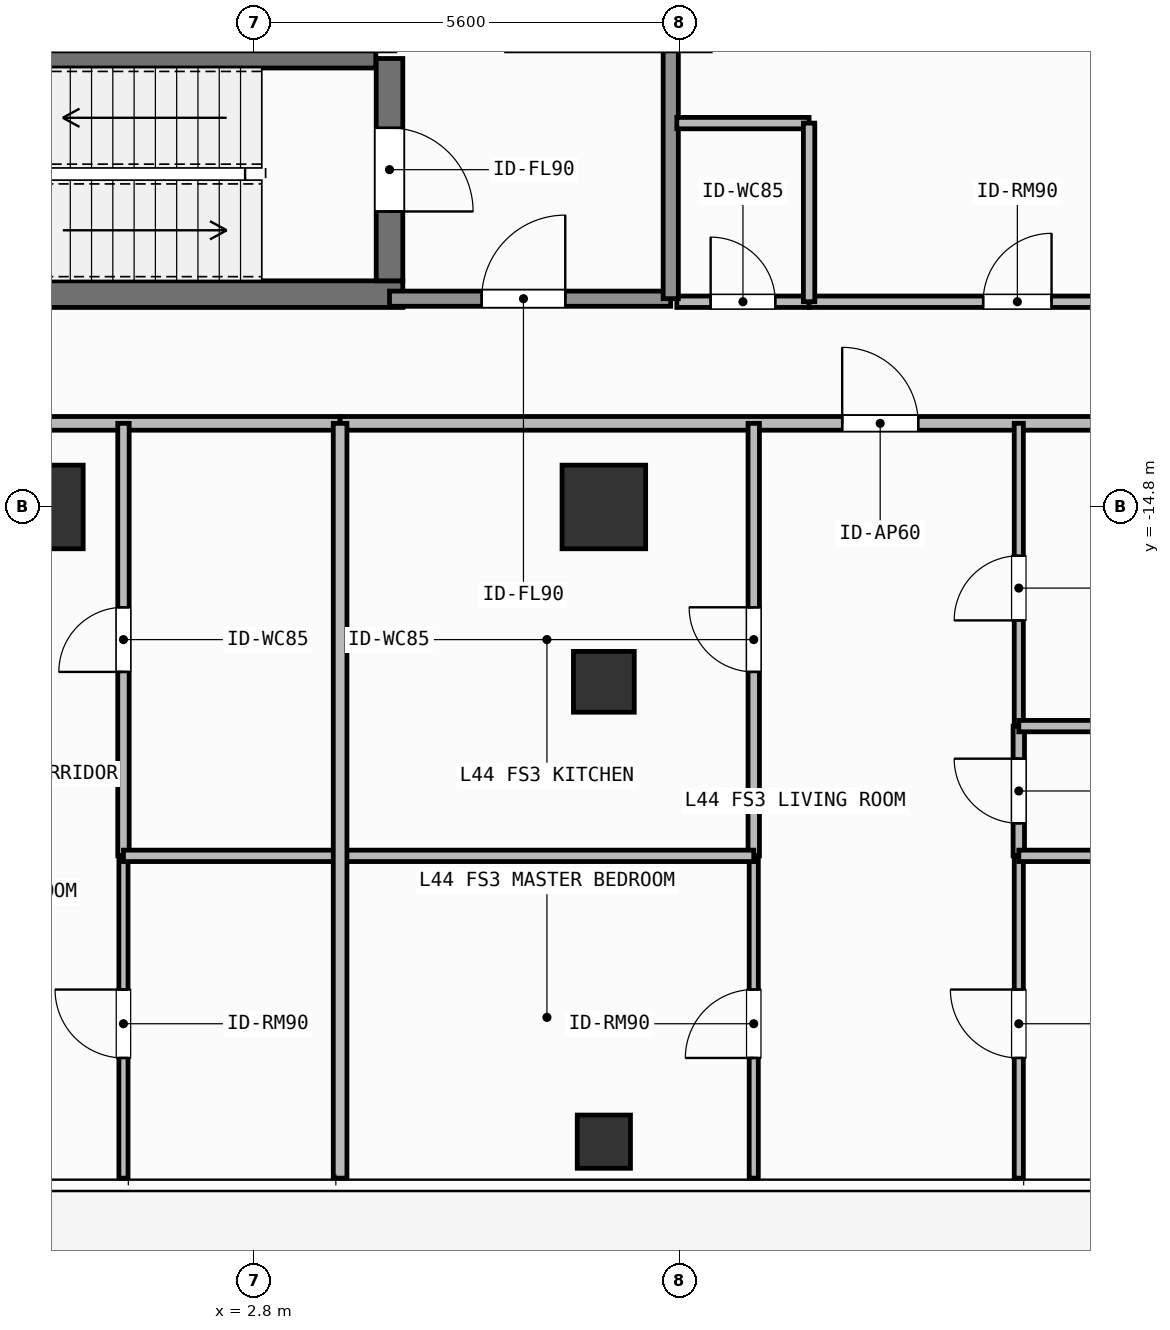
"""IFC4 building model, lengths in metres.
Left out: names, types, materials, properties, quantities, classifications, styles, units other than length and angle.
Written with IfcOpenShell. Run it as: python <this file> out.ifc"""

import sys

from ifc_helpers import new_model, si_unit, direction, frame, frame_2d, origin, origin_2d, place, context, subcontext, project, spatial, rectangle, hollow_rectangle, extrude, element, fill, save


model = new_model("IFC4")
c1 = context("Model", 3, precision=1e-05, world=origin(), true_north=direction((0.0, 1.0)))
c2 = subcontext(c1, "Body", "Model", "MODEL_VIEW")
j1 = project(units=[si_unit("LENGTHUNIT", "METRE"), si_unit("PLANEANGLEUNIT", "RADIAN")], contexts=[c1])
p1 = place(None, origin())
s1 = spatial("IfcSite", under=j1, at=p1, CompositionType="ELEMENT")
p2 = place(p1, origin())
s2 = spatial("IfcBuilding", under=s1, at=p2, CompositionType="ELEMENT")
p3 = place(p2, frame((0.0, 0.0, 179.7)))
s3 = spatial("IfcBuildingStorey", under=s2, at=p3, CompositionType="ELEMENT", Elevation=179.7)
p4 = place(p3, frame((-2.555, -12.0, 0.0), z_axis=(0.0, 0.0, 1.0), x_axis=(1.0, 0.0, 0.0)))
e1 = element("IfcWall", 1, at=p4, inside=s3, PredefinedType="SHEAR", context=c2, shape_type="SweptSolid", body=[
    extrude(rectangle(XDim=7.31, YDim=0.35, at=frame_2d((3.655, 0.0))), origin(), (0.0, 0.0, 1.0), 3.9),
])
p5 = place(p3, frame((-2.2, -8.913, 0.0), z_axis=(0.0, 0.0, 1.0), x_axis=(1.0, 0.0, 0.0)))
e2 = element("IfcWall", 2, at=p5, inside=s3, PredefinedType="SHEAR", context=c2, shape_type="SweptSolid", body=[
    extrude(rectangle(XDim=6.6, YDim=0.225, at=frame_2d((3.3, 0.0))), origin(), (0.0, 0.0, 1.0), 3.9),
])
p6 = place(p3, frame((4.58, -8.9, 0.0), z_axis=(0.0, 0.0, 1.0), x_axis=(0.0, -1.0, 0.0)))
e3 = element("IfcWall", 3, at=p6, inside=s3, PredefinedType="SHEAR", context=c2, shape_type="SweptSolid", body=[
    extrude(rectangle(XDim=2.925, YDim=0.35, at=frame_2d((1.462, 0.0))), origin(), (0.0, 0.0, 1.0), 3.9),
])
p7 = place(p6, frame((0.913, 0.0, 0.0)))
e4 = element("IfcOpeningElement", 4, at=p7, cuts=e3, PredefinedType="OPENING", context=c2, shape_type="SweptSolid", body=[
    extrude(rectangle(XDim=1.1, YDim=2.15, at=frame_2d((0.55, 1.075))), frame((0.0, 0.185, 0.0), z_axis=(0.0, -1.0, 0.0), x_axis=(1.0, 0.0, 0.0)), (0.0, 0.0, 1.0), 0.37),
])
for number, where, z_axis, x_axis in (
    (5, (0.0, -14.8, 0.0), (0.0, 0.0, 1.0), (1.0, 0.0, 0.0)),
    (6, (7.4, -14.8, 0.0), (0.0, 0.0, 1.0), (1.0, 0.0, 0.0)),
):
    element("IfcColumn", number, at=place(p3, frame(where, z_axis=z_axis, x_axis=x_axis)), inside=s3, PredefinedType="COLUMN", context=c2, shape_type="SweptSolid", body=[
        extrude(rectangle(XDim=1.1, YDim=1.1, at=origin_2d()), origin(), (0.0, 0.0, 1.0), 3.9),
    ])
p8 = place(p3, frame((7.4, -17.1, 0.0), z_axis=(0.0, 0.0, 1.0), x_axis=(1.0, 0.0, 0.0)))
e7 = element("IfcColumn", 7, at=p8, inside=s3, PredefinedType="COLUMN", context=c2, shape_type="SweptSolid", body=[
    extrude(hollow_rectangle(XDim=0.8, YDim=0.8, WallThickness=0.036, at=origin_2d()), origin(), (0.0, 0.0, 1.0), 3.9),
])
p9 = place(p3, frame((7.4, -23.15, 0.0), z_axis=(0.0, 0.0, 1.0), x_axis=(1.0, 0.0, 0.0)))
e8 = element("IfcColumn", 8, at=p9, inside=s3, PredefinedType="COLUMN", context=c2, shape_type="SweptSolid", body=[
    extrude(hollow_rectangle(XDim=0.7, YDim=0.7, WallThickness=0.032, at=origin_2d()), origin(), (0.0, 0.0, 1.0), 3.9),
])
p10 = place(p3, frame((4.58, -12.06, 0.0), z_axis=(0.0, 0.0, 1.0), x_axis=(1.0, 0.0, 0.0)))
e9 = element("IfcWall", 9, at=p10, inside=s3, PredefinedType="SOLIDWALL", context=c2, shape_type="SweptSolid", body=[
    extrude(rectangle(XDim=3.7, YDim=0.2, at=frame_2d((1.85, 0.0))), origin(), (0.0, 0.0, 1.0), 3.68),
])
p11 = place(p10, frame((1.212, 0.0, 0.0)))
e10 = element("IfcOpeningElement", 10, at=p11, cuts=e9, PredefinedType="OPENING", context=c2, shape_type="SweptSolid", body=[
    extrude(rectangle(XDim=1.1, YDim=2.15, at=frame_2d((0.55, 1.075))), frame((0.0, 0.11, 0.0), z_axis=(0.0, -1.0, 0.0), x_axis=(1.0, 0.0, 0.0)), (0.0, 0.0, 1.0), 0.22),
])
p12 = place(p3, frame((8.36, -12.1, 0.0), z_axis=(0.0, 0.0, 1.0), x_axis=(1.0, 0.0, 0.0)))
e11 = element("IfcWall", 11, at=p12, inside=s3, PredefinedType="PARTITIONING", context=c2, shape_type="SweptSolid", body=[
    extrude(rectangle(XDim=1.74, YDim=0.15, at=frame_2d((0.87, 0.0))), origin(), (0.0, 0.0, 1.0), 3.68),
])
p13 = place(p12, frame((0.445, 0.0, 0.0)))
e12 = element("IfcOpeningElement", 12, at=p13, cuts=e11, PredefinedType="OPENING", context=c2, shape_type="SweptSolid", body=[
    extrude(rectangle(XDim=0.85, YDim=2.1, at=frame_2d((0.425, 1.05))), frame((0.0, 0.085, 0.0), z_axis=(0.0, -1.0, 0.0), x_axis=(1.0, 0.0, 0.0)), (0.0, 0.0, 1.0), 0.17),
])
p14 = place(p3, frame((10.1, -12.1, 0.0), z_axis=(0.0, 0.0, 1.0), x_axis=(1.0, 0.0, 0.0)))
e13 = element("IfcWall", 13, at=p14, inside=s3, PredefinedType="PARTITIONING", context=c2, shape_type="SweptSolid", body=[
    extrude(rectangle(XDim=5.48, YDim=0.15, at=frame_2d((2.74, 0.0))), origin(), (0.0, 0.0, 1.0), 3.68),
])
p15 = place(p14, frame((2.29, 0.0, 0.0)))
e14 = element("IfcOpeningElement", 14, at=p15, cuts=e13, PredefinedType="OPENING", context=c2, shape_type="SweptSolid", body=[
    extrude(rectangle(XDim=0.9, YDim=2.1, at=frame_2d((0.45, 1.05))), frame((0.0, 0.085, 0.0), z_axis=(0.0, -1.0, 0.0), x_axis=(1.0, 0.0, 0.0)), (0.0, 0.0, 1.0), 0.17),
])
p16 = place(p3, frame((-6.618, -13.7, 0.0), z_axis=(0.0, 0.0, 1.0), x_axis=(1.0, 0.0, 0.0)))
e15 = element("IfcWall", 15, at=p16, inside=s3, PredefinedType="PARTITIONING", context=c2, shape_type="SweptSolid", body=[
    extrude(rectangle(XDim=10.548, YDim=0.18, at=frame_2d((5.274, 0.0))), origin(), (0.0, 0.0, 1.0), 3.68),
])
p17 = place(p16, frame((4.951, 0.0, 0.0)))
e16 = element("IfcOpeningElement", 16, at=p17, cuts=e15, PredefinedType="OPENING", context=c2, shape_type="SweptSolid", body=[
    extrude(rectangle(XDim=1.0, YDim=2.2, at=frame_2d((0.5, 1.1))), frame((0.0, 0.1, 0.0), z_axis=(0.0, -1.0, 0.0), x_axis=(1.0, 0.0, 0.0)), (0.0, 0.0, 1.0), 0.2),
])
p18 = place(p3, frame((1.08, -19.39, 0.0), z_axis=(0.0, 0.0, 1.0), x_axis=(0.0, 1.0, 0.0)))
e17 = element("IfcWall", 17, at=p18, inside=s3, PredefinedType="PARTITIONING", context=c2, shape_type="SweptSolid", body=[
    extrude(rectangle(XDim=5.69, YDim=0.15, at=frame_2d((2.845, 0.0))), origin(), (0.0, 0.0, 1.0), 3.68),
])
p19 = place(p18, frame((2.42, 0.0, 0.0)))
e18 = element("IfcOpeningElement", 18, at=p19, cuts=e17, PredefinedType="OPENING", context=c2, shape_type="SweptSolid", body=[
    extrude(rectangle(XDim=0.85, YDim=2.1, at=frame_2d((0.425, 1.05))), frame((0.0, 0.085, 0.0), z_axis=(0.0, -1.0, 0.0), x_axis=(1.0, 0.0, 0.0)), (0.0, 0.0, 1.0), 0.17),
])
p20 = place(p3, frame((1.08, -23.63, 0.0), z_axis=(0.0, 0.0, 1.0), x_axis=(0.0, 1.0, 0.0)))
e19 = element("IfcWall", 19, at=p20, inside=s3, PredefinedType="PARTITIONING", context=c2, shape_type="SweptSolid", body=[
    extrude(rectangle(XDim=4.24, YDim=0.12, at=frame_2d((2.12, 0.0))), origin(), (0.0, 0.0, 1.0), 3.68),
])
p21 = place(p20, frame((1.581, 0.0, 0.0)))
e20 = element("IfcOpeningElement", 20, at=p21, cuts=e19, PredefinedType="OPENING", context=c2, shape_type="SweptSolid", body=[
    extrude(rectangle(XDim=0.9, YDim=2.1, at=frame_2d((0.45, 1.05))), frame((0.0, 0.07, 0.0), z_axis=(0.0, -1.0, 0.0), x_axis=(1.0, 0.0, 0.0)), (0.0, 0.0, 1.0), 0.14),
])
p22 = place(p3, frame((3.93, -13.7, 0.0), z_axis=(0.0, 0.0, 1.0), x_axis=(1.0, 0.0, 0.0)))
e21 = element("IfcWall", 21, at=p22, inside=s3, PredefinedType="PARTITIONING", context=c2, shape_type="SweptSolid", body=[
    extrude(rectangle(XDim=14.39, YDim=0.18, at=frame_2d((7.195, 0.0))), origin(), (0.0, 0.0, 1.0), 3.68),
])
p23 = place(p22, frame((6.605, 0.0, 0.0)))
e22 = element("IfcOpeningElement", 22, at=p23, cuts=e21, PredefinedType="OPENING", context=c2, shape_type="SweptSolid", body=[
    extrude(rectangle(XDim=1.0, YDim=2.2, at=frame_2d((0.5, 1.1))), frame((0.0, 0.1, 0.0), z_axis=(0.0, -1.0, 0.0), x_axis=(1.0, 0.0, 0.0)), (0.0, 0.0, 1.0), 0.2),
])
p24 = place(p3, frame((9.372, -19.39, 0.0), z_axis=(0.0, 0.0, 1.0), x_axis=(0.0, 1.0, 0.0)))
e23 = element("IfcWall", 23, at=p24, inside=s3, PredefinedType="PARTITIONING", context=c2, shape_type="SweptSolid", body=[
    extrude(rectangle(XDim=5.69, YDim=0.15, at=frame_2d((2.845, 0.0))), origin(), (0.0, 0.0, 1.0), 3.68),
])
p25 = place(p24, frame((2.42, 0.0, 0.0)))
e24 = element("IfcOpeningElement", 24, at=p25, cuts=e23, PredefinedType="OPENING", context=c2, shape_type="SweptSolid", body=[
    extrude(rectangle(XDim=0.85, YDim=2.1, at=frame_2d((0.425, 1.05))), frame((0.0, 0.085, 0.0), z_axis=(0.0, -1.0, 0.0), x_axis=(1.0, 0.0, 0.0)), (0.0, 0.0, 1.0), 0.17),
])
p26 = place(p3, frame((9.372, -23.63, 0.0), z_axis=(0.0, 0.0, 1.0), x_axis=(0.0, 1.0, 0.0)))
e25 = element("IfcWall", 25, at=p26, inside=s3, PredefinedType="PARTITIONING", context=c2, shape_type="SweptSolid", body=[
    extrude(rectangle(XDim=4.24, YDim=0.12, at=frame_2d((2.12, 0.0))), origin(), (0.0, 0.0, 1.0), 3.68),
])
p27 = place(p26, frame((1.581, 0.0, 0.0)))
e26 = element("IfcOpeningElement", 26, at=p27, cuts=e25, PredefinedType="OPENING", context=c2, shape_type="SweptSolid", body=[
    extrude(rectangle(XDim=0.9, YDim=2.1, at=frame_2d((0.45, 1.05))), frame((0.0, 0.07, 0.0), z_axis=(0.0, -1.0, 0.0), x_axis=(1.0, 0.0, 0.0)), (0.0, 0.0, 1.0), 0.14),
])
p28 = place(p3, frame((12.859, -19.39, 0.0), z_axis=(0.0, 0.0, 1.0), x_axis=(0.0, 1.0, 0.0)))
e27 = element("IfcWall", 27, at=p28, inside=s3, PredefinedType="PARTITIONING", context=c2, shape_type="SweptSolid", body=[
    extrude(rectangle(XDim=1.707, YDim=0.15, at=frame_2d((0.854, 0.0))), origin(), (0.0, 0.0, 1.0), 3.68),
])
p29 = place(p28, frame((0.428, 0.0, 0.0)))
e28 = element("IfcOpeningElement", 28, at=p29, cuts=e27, PredefinedType="OPENING", context=c2, shape_type="SweptSolid", body=[
    extrude(rectangle(XDim=0.85, YDim=2.1, at=frame_2d((0.425, 1.05))), frame((0.0, 0.085, 0.0), z_axis=(0.0, -1.0, 0.0), x_axis=(1.0, 0.0, 0.0)), (0.0, 0.0, 1.0), 0.17),
])
p30 = place(p3, frame((12.859, -17.683, 0.0), z_axis=(0.0, 0.0, 1.0), x_axis=(0.0, 1.0, 0.0)))
e29 = element("IfcWall", 29, at=p30, inside=s3, PredefinedType="PARTITIONING", context=c2, shape_type="SweptSolid", body=[
    extrude(rectangle(XDim=3.983, YDim=0.12, at=frame_2d((1.992, 0.0))), origin(), (0.0, 0.0, 1.0), 3.68),
])
p31 = place(p30, frame((1.391, 0.0, 0.0)))
e30 = element("IfcOpeningElement", 30, at=p31, cuts=e29, PredefinedType="OPENING", context=c2, shape_type="SweptSolid", body=[
    extrude(rectangle(XDim=0.85, YDim=2.1, at=frame_2d((0.425, 1.05))), frame((0.0, 0.07, 0.0), z_axis=(0.0, -1.0, 0.0), x_axis=(1.0, 0.0, 0.0)), (0.0, 0.0, 1.0), 0.14),
])
p32 = place(p3, frame((12.859, -23.63, 0.0), z_axis=(0.0, 0.0, 1.0), x_axis=(0.0, 1.0, 0.0)))
e31 = element("IfcWall", 31, at=p32, inside=s3, PredefinedType="PARTITIONING", context=c2, shape_type="SweptSolid", body=[
    extrude(rectangle(XDim=4.24, YDim=0.12, at=frame_2d((2.12, 0.0))), origin(), (0.0, 0.0, 1.0), 3.68),
])
p33 = place(p32, frame((1.581, 0.0, 0.0)))
e32 = element("IfcOpeningElement", 32, at=p33, cuts=e31, PredefinedType="OPENING", context=c2, shape_type="SweptSolid", body=[
    extrude(rectangle(XDim=0.9, YDim=2.1, at=frame_2d((0.45, 1.05))), frame((0.0, 0.07, 0.0), z_axis=(0.0, -1.0, 0.0), x_axis=(1.0, 0.0, 0.0)), (0.0, 0.0, 1.0), 0.14),
])
p34 = place(p3, frame((8.28, -12.06, 0.0), z_axis=(0.0, 0.0, 1.0), x_axis=(0.0, 1.0, 0.0)))
e33 = element("IfcWall", 33, at=p34, inside=s3, PredefinedType="SOLIDWALL", context=c2, shape_type="SweptSolid", body=[
    extrude(rectangle(XDim=3.26, YDim=0.2, at=frame_2d((1.63, 0.0))), origin(), (0.0, 0.0, 1.0), 3.68),
])
p35 = place(p3, frame((8.36, -9.75, 0.0), z_axis=(0.0, 0.0, 1.0), x_axis=(1.0, 0.0, 0.0)))
e34 = element("IfcWall", 34, at=p35, inside=s3, PredefinedType="PARTITIONING", context=c2, shape_type="SweptSolid", body=[
    extrude(rectangle(XDim=1.74, YDim=0.15, at=frame_2d((0.87, 0.0))), origin(), (0.0, 0.0, 1.0), 3.68),
])
p36 = place(p3, frame((10.1, -12.1, 0.0), z_axis=(0.0, 0.0, 1.0), x_axis=(0.0, 1.0, 0.0)))
e35 = element("IfcWall", 35, at=p36, inside=s3, PredefinedType="PARTITIONING", context=c2, shape_type="SweptSolid", body=[
    extrude(rectangle(XDim=2.35, YDim=0.15, at=frame_2d((1.175, 0.0))), origin(), (0.0, 0.0, 1.0), 3.68),
])
p37 = place(p3, frame((1.08, -19.39, 0.0), z_axis=(0.0, 0.0, 1.0), x_axis=(1.0, 0.0, 0.0)))
e36 = element("IfcWall", 36, at=p37, inside=s3, PredefinedType="PARTITIONING", context=c2, shape_type="SweptSolid", body=[
    extrude(rectangle(XDim=2.85, YDim=0.15, at=frame_2d((1.425, 0.0))), origin(), (0.0, 0.0, 1.0), 3.68),
])
p38 = place(p3, frame((3.93, -19.39, 0.0), z_axis=(0.0, 0.0, 1.0), x_axis=(1.0, 0.0, 0.0)))
e37 = element("IfcWall", 37, at=p38, inside=s3, PredefinedType="PARTITIONING", context=c2, shape_type="SweptSolid", body=[
    extrude(rectangle(XDim=5.442, YDim=0.15, at=frame_2d((2.721, 0.0))), origin(), (0.0, 0.0, 1.0), 3.68),
])
for number, where, z_axis, x_axis in (
    (38, (12.859, -17.683, 0.0), (0.0, 0.0, 1.0), (1.0, 0.0, 0.0)),
    (39, (12.859, -19.39, 0.0), (0.0, 0.0, 1.0), (1.0, 0.0, 0.0)),
):
    element("IfcWall", number, at=place(p3, frame(where, z_axis=z_axis, x_axis=x_axis)), inside=s3, PredefinedType="PARTITIONING", context=c2, shape_type="SweptSolid", body=[
        extrude(rectangle(XDim=5.461, YDim=0.15, at=frame_2d((2.73, 0.0))), origin(), (0.0, 0.0, 1.0), 3.68),
    ])
p39 = place(p3, frame((3.93, -23.63, 0.0), z_axis=(0.0, 0.0, 1.0), x_axis=(0.0, 1.0, 0.0)))
e40 = element("IfcWall", 40, at=p39, inside=s3, PredefinedType="PARTITIONING", context=c2, shape_type="SweptSolid", body=[
    extrude(rectangle(XDim=9.93, YDim=0.18, at=frame_2d((4.965, 0.0))), origin(), (0.0, 0.0, 1.0), 3.68),
])
p40 = place(p7, origin())
e41 = element("IfcDoor", 41, at=p40, inside=s3, OperationType="SINGLE_SWING_RIGHT", PredefinedType="DOOR", context=c2, shape_type="SweptSolid", body=[
    extrude(rectangle(XDim=1.1, YDim=2.15, at=frame_2d((0.55, 1.075))), frame((0.0, 0.025, 0.0), z_axis=(0.0, -1.0, 0.0), x_axis=(1.0, 0.0, 0.0)), (0.0, 0.0, 1.0), 0.05),
])
fill(e4, e41)
p41 = place(p11, origin())
e42 = element("IfcDoor", 42, at=p41, inside=s3, OperationType="SINGLE_SWING_RIGHT", PredefinedType="DOOR", context=c2, shape_type="SweptSolid", body=[
    extrude(rectangle(XDim=1.1, YDim=2.15, at=frame_2d((0.55, 1.075))), frame((0.0, 0.025, 0.0), z_axis=(0.0, -1.0, 0.0), x_axis=(1.0, 0.0, 0.0)), (0.0, 0.0, 1.0), 0.05),
])
fill(e10, e42)
p42 = place(p13, origin())
e43 = element("IfcDoor", 43, at=p42, inside=s3, OperationType="SINGLE_SWING_LEFT", PredefinedType="DOOR", context=c2, shape_type="SweptSolid", body=[
    extrude(rectangle(XDim=0.85, YDim=2.1, at=frame_2d((0.425, 1.05))), frame((0.0, 0.025, 0.0), z_axis=(0.0, -1.0, 0.0), x_axis=(1.0, 0.0, 0.0)), (0.0, 0.0, 1.0), 0.05),
])
fill(e12, e43)
p43 = place(p15, origin())
e44 = element("IfcDoor", 44, at=p43, inside=s3, OperationType="SINGLE_SWING_RIGHT", PredefinedType="DOOR", context=c2, shape_type="SweptSolid", body=[
    extrude(rectangle(XDim=0.9, YDim=2.1, at=frame_2d((0.45, 1.05))), frame((0.0, 0.025, 0.0), z_axis=(0.0, -1.0, 0.0), x_axis=(1.0, 0.0, 0.0)), (0.0, 0.0, 1.0), 0.05),
])
fill(e14, e44)
p44 = place(p19, origin())
e45 = element("IfcDoor", 45, at=p44, inside=s3, OperationType="SINGLE_SWING_LEFT", PredefinedType="DOOR", context=c2, shape_type="SweptSolid", body=[
    extrude(rectangle(XDim=0.85, YDim=2.1, at=frame_2d((0.425, 1.05))), frame((0.0, 0.025, 0.0), z_axis=(0.0, -1.0, 0.0), x_axis=(1.0, 0.0, 0.0)), (0.0, 0.0, 1.0), 0.05),
])
fill(e18, e45)
p45 = place(p21, origin())
e46 = element("IfcDoor", 46, at=p45, inside=s3, OperationType="SINGLE_SWING_RIGHT", PredefinedType="DOOR", context=c2, shape_type="SweptSolid", body=[
    extrude(rectangle(XDim=0.9, YDim=2.1, at=frame_2d((0.45, 1.05))), frame((0.0, 0.025, 0.0), z_axis=(0.0, -1.0, 0.0), x_axis=(1.0, 0.0, 0.0)), (0.0, 0.0, 1.0), 0.05),
])
fill(e20, e46)
p46 = place(p23, origin())
e47 = element("IfcDoor", 47, at=p46, inside=s3, OperationType="SINGLE_SWING_LEFT", PredefinedType="DOOR", context=c2, shape_type="SweptSolid", body=[
    extrude(rectangle(XDim=1.0, YDim=2.2, at=frame_2d((0.5, 1.1))), frame((0.0, 0.025, 0.0), z_axis=(0.0, -1.0, 0.0), x_axis=(1.0, 0.0, 0.0)), (0.0, 0.0, 1.0), 0.05),
])
fill(e22, e47)
p47 = place(p25, origin())
e48 = element("IfcDoor", 48, at=p47, inside=s3, OperationType="SINGLE_SWING_RIGHT", PredefinedType="DOOR", context=c2, shape_type="SweptSolid", body=[
    extrude(rectangle(XDim=0.85, YDim=2.1, at=frame_2d((0.425, 1.05))), frame((0.0, 0.025, 0.0), z_axis=(0.0, -1.0, 0.0), x_axis=(1.0, 0.0, 0.0)), (0.0, 0.0, 1.0), 0.05),
])
fill(e24, e48)
p48 = place(p27, origin())
e49 = element("IfcDoor", 49, at=p48, inside=s3, OperationType="SINGLE_SWING_LEFT", PredefinedType="DOOR", context=c2, shape_type="SweptSolid", body=[
    extrude(rectangle(XDim=0.9, YDim=2.1, at=frame_2d((0.45, 1.05))), frame((0.0, 0.025, 0.0), z_axis=(0.0, -1.0, 0.0), x_axis=(1.0, 0.0, 0.0)), (0.0, 0.0, 1.0), 0.05),
])
fill(e26, e49)
p49 = place(p29, origin())
e50 = element("IfcDoor", 50, at=p49, inside=s3, OperationType="SINGLE_SWING_RIGHT", PredefinedType="DOOR", context=c2, shape_type="SweptSolid", body=[
    extrude(rectangle(XDim=0.85, YDim=2.1, at=frame_2d((0.425, 1.05))), frame((0.0, 0.025, 0.0), z_axis=(0.0, -1.0, 0.0), x_axis=(1.0, 0.0, 0.0)), (0.0, 0.0, 1.0), 0.05),
])
fill(e28, e50)
p50 = place(p31, origin())
e51 = element("IfcDoor", 51, at=p50, inside=s3, OperationType="SINGLE_SWING_LEFT", PredefinedType="DOOR", context=c2, shape_type="SweptSolid", body=[
    extrude(rectangle(XDim=0.85, YDim=2.1, at=frame_2d((0.425, 1.05))), frame((0.0, 0.025, 0.0), z_axis=(0.0, -1.0, 0.0), x_axis=(1.0, 0.0, 0.0)), (0.0, 0.0, 1.0), 0.05),
])
fill(e30, e51)
p51 = place(p33, origin())
e52 = element("IfcDoor", 52, at=p51, inside=s3, OperationType="SINGLE_SWING_RIGHT", PredefinedType="DOOR", context=c2, shape_type="SweptSolid", body=[
    extrude(rectangle(XDim=0.9, YDim=2.1, at=frame_2d((0.45, 1.05))), frame((0.0, 0.025, 0.0), z_axis=(0.0, -1.0, 0.0), x_axis=(1.0, 0.0, 0.0)), (0.0, 0.0, 1.0), 0.05),
])
fill(e32, e52)
save(model, sys.argv[1])
